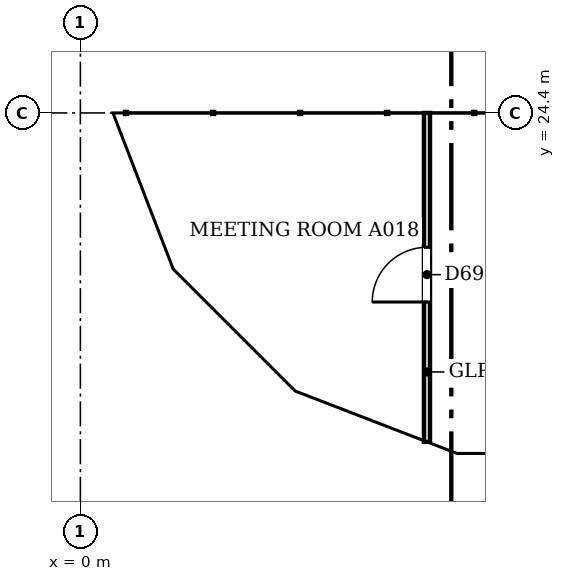
"""IFC4 building model, lengths in metres.
Left out: names, types, materials, properties, quantities, classifications, styles, units other than length and angle.
Written with IfcOpenShell. Run it as: python <this file> out.ifc"""

import sys

from ifc_helpers import new_model, si_unit, direction, frame, frame_2d, origin, place, context, subcontext, project, spatial, polyline, rectangle, outline, extrude, faceted_brep, source, transform, mapped, element, fill, save


model = new_model("IFC4")
c1 = context("Model", 3, precision=1e-05, world=origin(), true_north=direction((0.0, 1.0)))
c2 = subcontext(c1, "Body", "Model", "MODEL_VIEW")
j1 = project(units=[si_unit("LENGTHUNIT", "METRE"), si_unit("PLANEANGLEUNIT", "RADIAN")], contexts=[c1])
p1 = place(None, origin())
s1 = spatial("IfcSite", under=j1, at=p1, CompositionType="ELEMENT")
p2 = place(p1, origin())
s2 = spatial("IfcBuilding", under=s1, at=p2, CompositionType="ELEMENT")
p3 = place(p2, frame((0.0, 0.0, 170.6)))
s3 = spatial("IfcBuildingStorey", under=s2, at=p3, CompositionType="ELEMENT", Elevation=170.6)
m1 = source(origin(), c2, "Body", "Brep", [
    faceted_brep([(3.05, -0.25, 0.0), (6.053, -0.25, 3.8), (3.05, -0.25, 7.6), (0.0, -0.25, 3.8), (0.0, 0.25, 3.8), (3.05, 0.25, 7.6), (6.007, 0.25, 3.859), (6.007, 0.25, 3.741), (3.05, 0.25, 0.0), (6.053, 0.0, 3.8)], [[[0, 1, 2, 3]], [[4, 5, 6, 7, 8]], [[8, 7, 9, 1, 0]], [[6, 5, 2, 1, 9]], [[5, 4, 3, 2]], [[4, 8, 0, 3]], [[7, 6, 9]]]),
])
p4 = place(p3, frame((0.25, 30.5, -3.8), z_axis=(0.0, 0.0, 1.0), x_axis=(0.0, -1.0, 0.0)))
e1 = element("IfcWall", 1, at=p4, inside=s3, PredefinedType="SOLIDWALL", context=c2, shape_type="MappedRepresentation", body=[
    mapped(m1, transform((0.0, 0.0, 0.0), scale=1.0)),
])
m2 = source(origin(), c2, "Body", "SweptSolid", [
    extrude(outline(polyline([(3.049, 0.401), (5.735, 3.8), (3.049, 7.199), (0.321, 3.8), (3.049, 0.401)])), frame((0.0, 0.26, 0.0), z_axis=(0.0, -1.0, 0.0), x_axis=(1.0, 0.0, 0.0)), (0.0, 0.0, 1.0), 0.52),
])
p5 = place(p4, origin())
e2 = element("IfcOpeningElement", 2, at=p5, cuts=e1, PredefinedType="OPENING", context=c2, shape_type="MappedRepresentation", body=[
    mapped(m2, transform((0.0, 0.0, 0.0), scale=1.0)),
])
m3 = source(origin(), c2, "Body", "Brep", [
    faceted_brep([(2.95, -0.25, 0.0), (3.003, -0.25, 0.068), (3.003, -0.25, 7.531), (2.95, -0.25, 7.6), (0.0, -0.25, 3.8), (0.047, 0.25, 3.86), (2.898, 0.25, 7.532), (2.898, 0.25, 0.068), (0.047, 0.25, 3.74), (2.95, 0.0, 0.0), (2.95, 0.0, 7.6), (0.0, 0.0, 3.8)], [[[0, 1, 2, 3, 4]], [[5, 6, 7, 8]], [[1, 0, 9]], [[10, 3, 2]], [[6, 5, 11, 4, 3, 10]], [[8, 7, 9, 0, 4, 11]], [[8, 11, 5]], [[1, 9, 7, 6, 10, 2]]]),
])
p6 = place(p3, frame((0.25, 24.447, -3.8), z_axis=(0.0, 0.0, 1.0), x_axis=(0.35992665181, -0.932980602862, 0.0)))
e3 = element("IfcWall", 3, at=p6, inside=s3, PredefinedType="SOLIDWALL", context=c2, shape_type="MappedRepresentation", body=[
    mapped(m3, transform((0.0, 0.0, 0.0), scale=1.0)),
])
m4 = source(origin(), c2, "Body", "SweptSolid", [
    extrude(outline(polyline([(2.75, 6.935), (0.316, 3.8), (2.75, 0.665), (2.75, 6.935)])), frame((0.0, 0.26, 0.0), z_axis=(0.0, -1.0, 0.0), x_axis=(1.0, 0.0, 0.0)), (0.0, 0.0, 1.0), 0.52),
])
p7 = place(p6, origin())
e4 = element("IfcOpeningElement", 4, at=p7, cuts=e3, PredefinedType="OPENING", context=c2, shape_type="MappedRepresentation", body=[
    mapped(m4, transform((0.0, 0.0, 0.0), scale=1.0)),
])
m5 = source(origin(), c2, "Body", "Brep", [
    faceted_brep([(0.053, -0.25, 0.0), (2.997, -0.25, 3.8), (0.053, -0.25, 7.6), (0.0, -0.25, 7.532), (0.0, -0.25, 0.068), (0.106, 0.25, 7.531), (2.944, 0.25, 3.868), (2.944, 0.25, 3.732), (0.106, 0.25, 0.068), (2.997, 0.0, 3.8), (0.053, 0.0, 0.0), (0.053, 0.0, 7.6)], [[[0, 1, 2, 3, 4]], [[5, 6, 7, 8]], [[8, 7, 9, 1, 0, 10]], [[6, 5, 11, 2, 1, 9]], [[3, 2, 11]], [[10, 0, 4]], [[8, 10, 4, 3, 11, 5]], [[7, 6, 9]]]),
])
p8 = place(p3, frame((1.274, 21.731, -3.8), z_axis=(0.0, 0.0, 1.0), x_axis=(0.707147509625, -0.707066050402, 0.0)))
e5 = element("IfcWall", 5, at=p8, inside=s3, PredefinedType="SOLIDWALL", context=c2, shape_type="MappedRepresentation", body=[
    mapped(m5, transform((0.0, 0.0, 0.0), scale=1.0)),
])
m6 = source(origin(), c2, "Body", "SweptSolid", [
    extrude(outline(polyline([(0.253, 0.666), (2.681, 3.8), (0.253, 6.934), (0.253, 0.666)])), frame((0.0, 0.26, 0.0), z_axis=(0.0, -1.0, 0.0), x_axis=(1.0, 0.0, 0.0)), (0.0, 0.0, 1.0), 0.52),
])
p9 = place(p8, origin())
e6 = element("IfcOpeningElement", 6, at=p9, cuts=e5, PredefinedType="OPENING", context=c2, shape_type="MappedRepresentation", body=[
    mapped(m6, transform((0.0, 0.0, 0.0), scale=1.0)),
])
m7 = source(origin(), c2, "Body", "Brep", [
    faceted_brep([(2.95, -0.25, 0.0), (2.997, -0.25, 0.059), (2.997, -0.25, 7.541), (2.95, -0.25, 7.6), (0.0, -0.25, 3.8), (0.053, 0.25, 3.868), (2.904, 0.25, 7.54), (2.904, 0.25, 0.06), (0.053, 0.25, 3.732), (2.95, 0.0, 0.0), (2.95, 0.0, 7.6), (0.0, 0.0, 3.8)], [[[0, 1, 2, 3, 4]], [[5, 6, 7, 8]], [[1, 0, 9]], [[10, 3, 2]], [[6, 5, 11, 4, 3, 10]], [[8, 7, 9, 0, 4, 11]], [[8, 11, 5]], [[1, 9, 7, 6, 10, 2]]]),
])
p10 = place(p3, frame((3.394, 19.612, -3.8), z_axis=(0.0, 0.0, 1.0), x_axis=(0.932990326376, -0.359901446078, 0.0)))
e7 = element("IfcWall", 7, at=p10, inside=s3, PredefinedType="SOLIDWALL", context=c2, shape_type="MappedRepresentation", body=[
    mapped(m7, transform((0.0, 0.0, 0.0), scale=1.0)),
])
p11 = place(p10, origin())
e8 = element("IfcOpeningElement", 8, at=p11, cuts=e7, PredefinedType="OPENING", context=c2, shape_type="MappedRepresentation", body=[
    mapped(m4, transform((0.0, 0.0, 0.0), scale=1.0)),
])
m8 = source(origin(), c2, "Body", "Brep", [
    faceted_brep([(0.047, -0.25, 0.0), (3.05, -0.25, 3.8), (0.047, -0.25, 7.6), (0.0, -0.25, 7.54), (0.0, -0.25, 0.06), (0.093, 0.25, 7.541), (3.05, 0.25, 3.8), (0.093, 0.25, 0.059), (0.047, 0.0, 0.0), (0.047, 0.0, 7.6)], [[[0, 1, 2, 3, 4]], [[5, 6, 7]], [[7, 6, 1, 0, 8]], [[6, 5, 9, 2, 1]], [[3, 2, 9]], [[8, 0, 4]], [[7, 8, 4, 3, 9, 5]]]),
])
p12 = place(p3, frame((6.1, 18.55, -3.8), z_axis=(0.0, 0.0, 1.0), x_axis=(1.0, 0.0, 0.0)))
e9 = element("IfcWall", 9, at=p12, inside=s3, PredefinedType="SOLIDWALL", context=c2, shape_type="MappedRepresentation", body=[
    mapped(m8, transform((0.0, 0.0, 0.0), scale=1.0)),
])
m9 = source(origin(), c2, "Body", "SweptSolid", [
    extrude(outline(polyline([(0.247, 0.656), (2.731, 3.8), (0.247, 6.944), (0.247, 0.656)])), frame((0.0, 0.26, 0.0), z_axis=(0.0, -1.0, 0.0), x_axis=(1.0, 0.0, 0.0)), (0.0, 0.0, 1.0), 0.52),
])
p13 = place(p12, origin())
e10 = element("IfcOpeningElement", 10, at=p13, cuts=e9, PredefinedType="OPENING", context=c2, shape_type="MappedRepresentation", body=[
    mapped(m9, transform((0.0, 0.0, 0.0), scale=1.0)),
])
p14 = place(p2, frame((0.0, 0.0, 174.4)))
s4 = spatial("IfcBuildingStorey", under=s2, at=p14, CompositionType="ELEMENT", Elevation=174.4)
m10 = source(origin(), c2, "Body", "Brep", [
    faceted_brep([(3.003, -0.25, 0.0), (3.05, -0.25, 0.06), (3.05, -0.25, 7.54), (3.003, -0.25, 7.6), (0.0, -0.25, 3.8), (0.0, 0.25, 3.8), (2.957, 0.25, 7.541), (2.957, 0.25, 0.059), (3.003, 0.0, 0.0), (3.003, 0.0, 7.6)], [[[0, 1, 2, 3, 4]], [[5, 6, 7]], [[1, 0, 8]], [[9, 3, 2]], [[6, 5, 4, 3, 9]], [[5, 7, 8, 0, 4]], [[1, 8, 7, 6, 9, 2]]]),
])
p15 = place(p14, frame((0.25, 27.45, -3.8), z_axis=(0.0, 0.0, 1.0), x_axis=(0.0, -1.0, 0.0)))
e11 = element("IfcWall", 11, at=p15, inside=s4, PredefinedType="SOLIDWALL", context=c2, shape_type="MappedRepresentation", body=[
    mapped(m10, transform((0.0, 0.0, 0.0), scale=1.0)),
])
m11 = source(origin(), c2, "Body", "SweptSolid", [
    extrude(outline(polyline([(2.803, 6.944), (0.319, 3.8), (2.803, 0.656), (2.803, 6.944)])), frame((0.0, 0.26, 0.0), z_axis=(0.0, -1.0, 0.0), x_axis=(1.0, 0.0, 0.0)), (0.0, 0.0, 1.0), 0.52),
])
p16 = place(p15, origin())
e12 = element("IfcOpeningElement", 12, at=p16, cuts=e11, PredefinedType="OPENING", context=c2, shape_type="MappedRepresentation", body=[
    mapped(m11, transform((0.0, 0.0, 0.0), scale=1.0)),
])
m12 = source(origin(), c2, "Body", "Brep", [
    faceted_brep([(0.047, -0.25, 0.0), (2.997, -0.25, 3.8), (0.047, -0.25, 7.6), (0.0, -0.25, 7.541), (0.0, -0.25, 0.059), (0.093, 0.25, 7.54), (2.944, 0.25, 3.868), (2.944, 0.25, 3.732), (0.093, 0.25, 0.06), (2.997, 0.0, 3.8), (0.047, 0.0, 0.0), (0.047, 0.0, 7.6)], [[[0, 1, 2, 3, 4]], [[5, 6, 7, 8]], [[8, 7, 9, 1, 0, 10]], [[6, 5, 11, 2, 1, 9]], [[3, 2, 11]], [[10, 0, 4]], [[8, 10, 4, 3, 11, 5]], [[9, 7, 6]]]),
])
p17 = place(p14, frame((0.233, 24.49, -3.8), z_axis=(0.0, 0.0, 1.0), x_axis=(0.359901446078, -0.932990326376, 0.0)))
e13 = element("IfcWall", 13, at=p17, inside=s4, PredefinedType="SOLIDWALL", context=c2, shape_type="MappedRepresentation", body=[
    mapped(m12, transform((0.0, 0.0, 0.0), scale=1.0)),
])
m13 = source(origin(), c2, "Body", "SweptSolid", [
    extrude(outline(polyline([(0.247, 0.665), (2.681, 3.8), (0.247, 6.935), (0.247, 0.665)])), frame((0.0, 0.26, 0.0), z_axis=(0.0, -1.0, 0.0), x_axis=(1.0, 0.0, 0.0)), (0.0, 0.0, 1.0), 0.52),
])
p18 = place(p17, origin())
e14 = element("IfcOpeningElement", 14, at=p18, cuts=e13, PredefinedType="OPENING", context=c2, shape_type="MappedRepresentation", body=[
    mapped(m13, transform((0.0, 0.0, 0.0), scale=1.0)),
])
m14 = source(origin(), c2, "Body", "Brep", [
    faceted_brep([(2.944, -0.25, 0.0), (2.997, -0.25, 0.068), (2.997, -0.25, 7.532), (2.944, -0.25, 7.6), (0.0, -0.25, 3.8), (0.053, 0.25, 3.868), (2.891, 0.25, 7.532), (2.891, 0.25, 0.068), (0.053, 0.25, 3.731), (2.944, 0.0, 0.0), (2.944, 0.0, 7.6), (0.0, 0.0, 3.8)], [[[0, 1, 2, 3, 4]], [[5, 6, 7, 8]], [[1, 0, 9]], [[10, 3, 2]], [[6, 5, 11, 4, 3, 10]], [[8, 7, 9, 0, 4, 11]], [[8, 11, 5]], [[1, 9, 7, 6, 10, 2]]]),
])
p19 = place(p14, frame((1.312, 21.694, -3.8), z_axis=(0.0, 0.0, 1.0), x_axis=(0.707066050402, -0.707147509625, 0.0)))
e15 = element("IfcWall", 15, at=p19, inside=s4, PredefinedType="SOLIDWALL", context=c2, shape_type="MappedRepresentation", body=[
    mapped(m14, transform((0.0, 0.0, 0.0), scale=1.0)),
])
m15 = source(origin(), c2, "Body", "SweptSolid", [
    extrude(outline(polyline([(2.744, 6.934), (0.316, 3.8), (2.744, 0.666), (2.744, 6.934)])), frame((0.0, 0.26, 0.0), z_axis=(0.0, -1.0, 0.0), x_axis=(1.0, 0.0, 0.0)), (0.0, 0.0, 1.0), 0.52),
])
p20 = place(p19, origin())
e16 = element("IfcOpeningElement", 16, at=p20, cuts=e15, PredefinedType="OPENING", context=c2, shape_type="MappedRepresentation", body=[
    mapped(m15, transform((0.0, 0.0, 0.0), scale=1.0)),
])
m16 = source(origin(), c2, "Body", "Brep", [
    faceted_brep([(0.053, -0.25, 0.0), (3.003, -0.25, 3.8), (0.053, -0.25, 7.6), (0.0, -0.25, 7.531), (0.0, -0.25, 0.068), (0.106, 0.25, 7.532), (2.957, 0.25, 3.86), (2.957, 0.25, 3.74), (0.106, 0.25, 0.068), (3.003, 0.0, 3.8), (0.053, 0.0, 0.0), (0.053, 0.0, 7.6)], [[[0, 1, 2, 3, 4]], [[5, 6, 7, 8]], [[8, 7, 9, 1, 0, 10]], [[6, 5, 11, 2, 1, 9]], [[3, 2, 11]], [[10, 0, 4]], [[8, 10, 4, 3, 11, 5]], [[9, 7, 6]]]),
])
p21 = place(p14, frame((3.344, 19.631, -3.8), z_axis=(0.0, 0.0, 1.0), x_axis=(0.933007896601, -0.359855894603, 0.0)))
e17 = element("IfcWall", 17, at=p21, inside=s4, PredefinedType="SOLIDWALL", context=c2, shape_type="MappedRepresentation", body=[
    mapped(m16, transform((0.0, 0.0, 0.0), scale=1.0)),
])
m17 = source(origin(), c2, "Body", "SweptSolid", [
    extrude(outline(polyline([(0.253, 0.665), (2.687, 3.8), (0.253, 6.935), (0.253, 0.665)])), frame((0.0, 0.26, 0.0), z_axis=(0.0, -1.0, 0.0), x_axis=(1.0, 0.0, 0.0)), (0.0, 0.0, 1.0), 0.52),
])
p22 = place(p21, origin())
e18 = element("IfcOpeningElement", 18, at=p22, cuts=e17, PredefinedType="OPENING", context=c2, shape_type="MappedRepresentation", body=[
    mapped(m17, transform((0.0, 0.0, 0.0), scale=1.0)),
])
m18 = source(origin(), c2, "Body", "Brep", [
    faceted_brep([(3.003, -0.25, 0.0), (6.053, -0.25, 3.8), (3.003, -0.25, 7.6), (0.0, -0.25, 3.8), (0.047, 0.25, 3.859), (3.003, 0.25, 7.6), (6.053, 0.25, 3.8), (3.003, 0.25, 0.0), (0.047, 0.25, 3.741), (0.0, 0.0, 3.8)], [[[0, 1, 2, 3]], [[4, 5, 6, 7, 8]], [[7, 6, 1, 0]], [[6, 5, 2, 1]], [[5, 4, 9, 3, 2]], [[8, 7, 0, 3, 9]], [[8, 9, 4]]]),
])
p23 = place(p14, frame((6.146, 18.55, -3.8), z_axis=(0.0, 0.0, 1.0), x_axis=(1.0, 0.0, 0.0)))
e19 = element("IfcWall", 19, at=p23, inside=s4, PredefinedType="SOLIDWALL", context=c2, shape_type="MappedRepresentation", body=[
    mapped(m18, transform((0.0, 0.0, 0.0), scale=1.0)),
])
m19 = source(origin(), c2, "Body", "SweptSolid", [
    extrude(outline(polyline([(3.005, 0.401), (5.733, 3.8), (3.005, 7.199), (0.319, 3.8), (3.005, 0.401)])), frame((0.0, 0.26, 0.0), z_axis=(0.0, -1.0, 0.0), x_axis=(1.0, 0.0, 0.0)), (0.0, 0.0, 1.0), 0.52),
])
p24 = place(p23, origin())
e20 = element("IfcOpeningElement", 20, at=p24, cuts=e19, PredefinedType="OPENING", context=c2, shape_type="MappedRepresentation", body=[
    mapped(m19, transform((0.0, 0.0, 0.0), scale=1.0)),
])
p25 = place(p3, frame((5.7, 18.99, 0.0), z_axis=(0.0, 0.0, 1.0), x_axis=(0.0, 1.0, 0.0)))
e21 = element("IfcWall", 21, at=p25, inside=s3, PredefinedType="PARTITIONING", context=c2, shape_type="SweptSolid", body=[
    extrude(rectangle(XDim=5.41, YDim=0.1, at=frame_2d((2.705, 0.0))), origin(), (0.0, 0.0, 1.0), 3.067),
])
m20 = source(origin(), c2, "Body", "SweptSolid", [
    extrude(rectangle(XDim=0.9, YDim=2.1, at=frame_2d((0.45, 1.05))), frame((0.0, 0.06, 0.0), z_axis=(0.0, -1.0, 0.0), x_axis=(1.0, 0.0, 0.0)), (0.0, 0.0, 1.0), 0.12),
])
p26 = place(p25, frame((2.3, 0.0, 0.0)))
e22 = element("IfcOpeningElement", 22, at=p26, cuts=e21, PredefinedType="OPENING", context=c2, shape_type="MappedRepresentation", body=[
    mapped(m20, transform((0.0, 0.0, 0.0), scale=1.0)),
])
m21 = source(origin(), c2, "Body", "SweptSolid", [
    extrude(rectangle(XDim=0.9, YDim=2.1, at=frame_2d((0.45, 1.05))), frame((0.0, 0.025, 0.0), z_axis=(0.0, -1.0, 0.0), x_axis=(1.0, 0.0, 0.0)), (0.0, 0.0, 1.0), 0.05),
])
p27 = place(p26, origin())
e23 = element("IfcDoor", 23, at=p27, inside=s3, OperationType="SINGLE_SWING_LEFT", PredefinedType="DOOR", context=c2, shape_type="MappedRepresentation", body=[
    mapped(m21, transform((0.0, 0.0, 0.0), scale=1.0)),
])
fill(e22, e23)
save(model, sys.argv[1])
